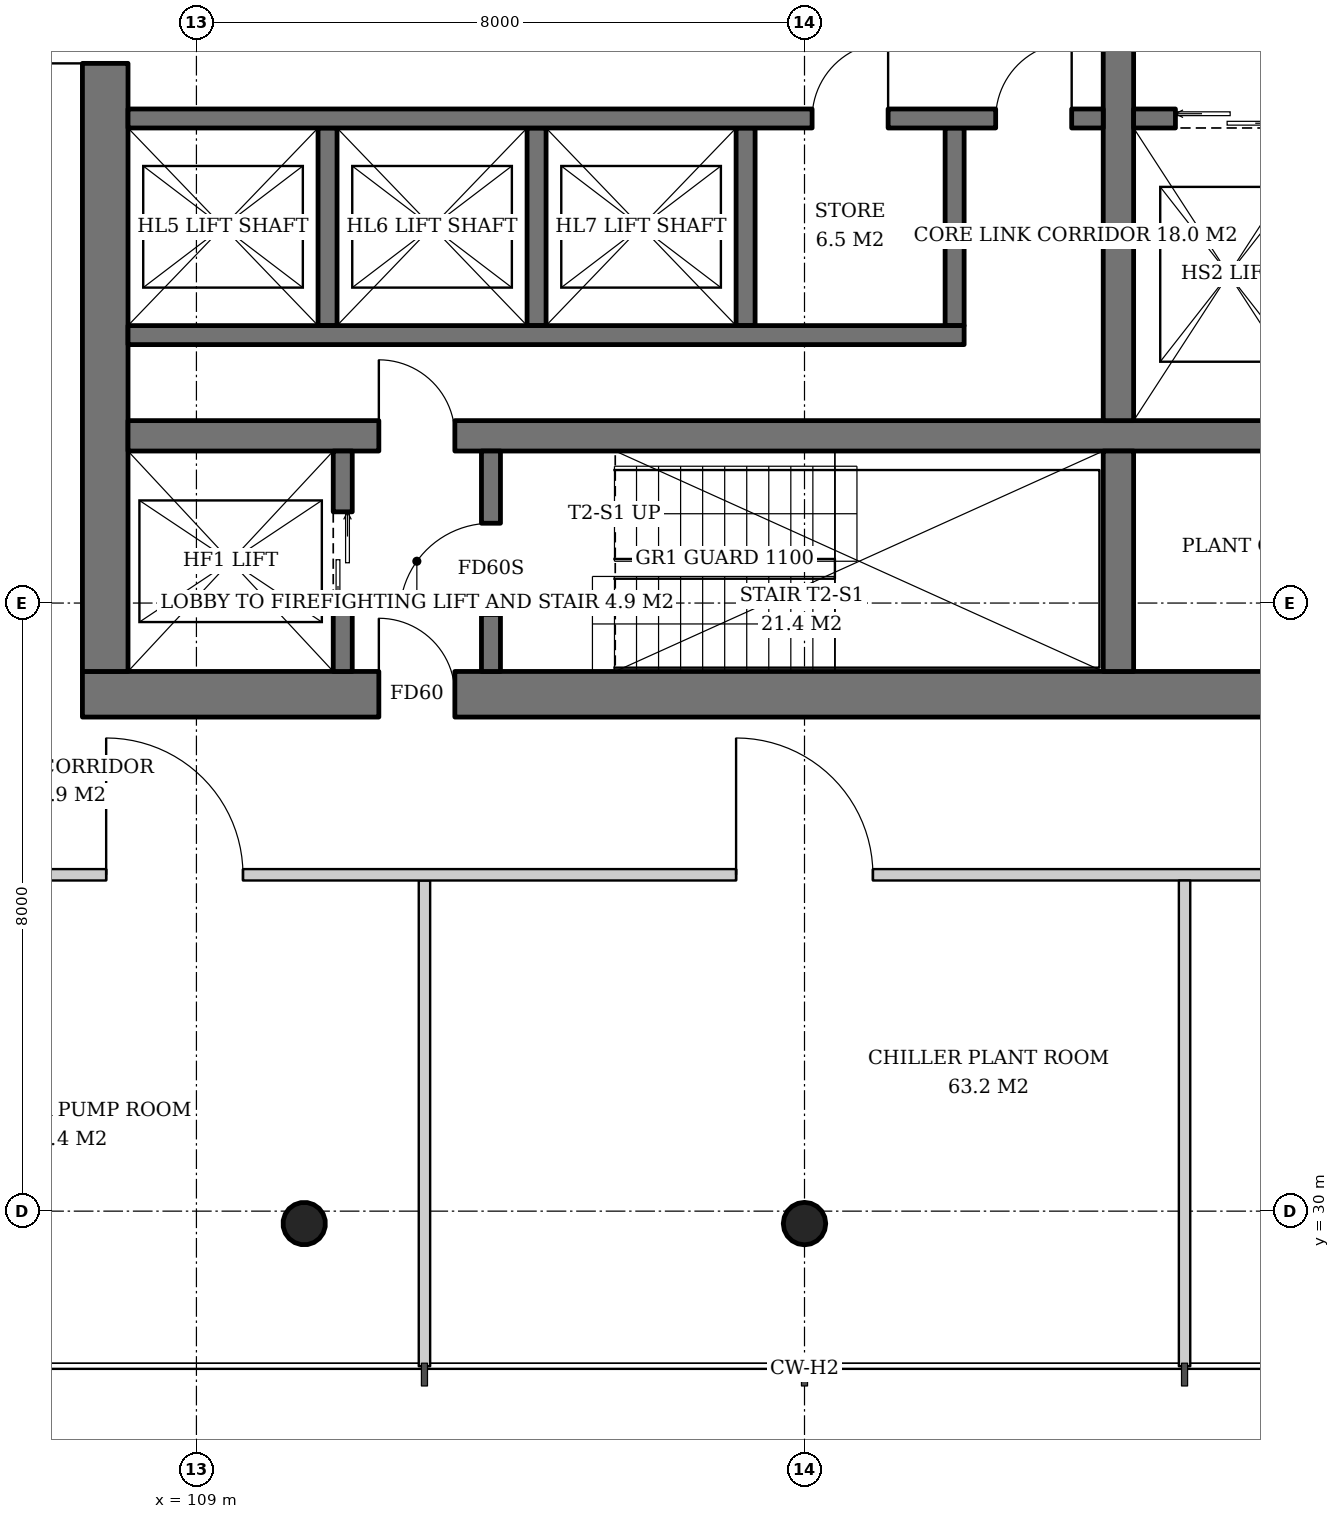
"""IFC4 building model, lengths in metres.
Left out: names, types, materials, properties, quantities, classifications, styles, units other than length and angle.
Written with IfcOpenShell. Run it as: python <this file> out.ifc"""

import sys

from ifc_helpers import new_model, si_unit, direction, frame, frame_2d, origin, origin_2d, place, context, subcontext, project, spatial, rectangle, hollow_circle, extrude, element, fill, save


model = new_model("IFC4")
c1 = context("Model", 3, precision=1e-05, world=origin(), true_north=direction((0.0, 1.0)))
c2 = subcontext(c1, "Body", "Model", "MODEL_VIEW")
j1 = project(units=[si_unit("LENGTHUNIT", "METRE"), si_unit("PLANEANGLEUNIT", "RADIAN")], contexts=[c1])
p1 = place(None, origin())
s1 = spatial("IfcSite", under=j1, at=p1, CompositionType="ELEMENT")
p2 = place(p1, origin())
s2 = spatial("IfcBuilding", under=s1, at=p2, CompositionType="ELEMENT")
p3 = place(p2, frame((0.0, 0.0, 85.6)))
s3 = spatial("IfcBuildingStorey", under=s2, at=p3, CompositionType="ELEMENT", Elevation=85.6)
p4 = place(p3, frame((110.392, 29.784, 0.0), z_axis=(0.02149908433, 0.04306234503, 0.998841040313), x_axis=(-0.894693706707, 0.446680166538, 0.0)))
e1 = element("IfcColumn", 1, at=p4, inside=s3, PredefinedType="COLUMN", context=c2, shape_type="SweptSolid", body=[
    extrude(hollow_circle(Radius=0.28, WallThickness=0.02, at=origin_2d()), origin(), (0.0, 0.0, 1.0), 3.804),
])
p5 = place(p3, frame((117.0, 29.784, 0.0), z_axis=(0.0, 0.043072300418, 0.999071957837), x_axis=(-1.0, 0.0, 0.0)))
e2 = element("IfcColumn", 2, at=p5, inside=s3, PredefinedType="COLUMN", context=c2, shape_type="SweptSolid", body=[
    extrude(hollow_circle(Radius=0.28, WallThickness=0.02, at=origin_2d()), origin(), (0.0, 0.0, 1.0), 3.803),
])
p6 = place(p3, frame((107.5, 36.8, 0.0), z_axis=(0.0, 0.0, 1.0), x_axis=(1.0, 0.0, 0.0)))
e3 = element("IfcWall", 3, at=p6, inside=s3, PredefinedType="SHEAR", context=c2, shape_type="SweptSolid", body=[
    extrude(rectangle(XDim=19.0, YDim=0.6, at=frame_2d((9.5, 0.0))), origin(), (0.0, 0.0, 1.0), 3.8),
])
p7 = place(p6, frame((3.9, 0.0, 0.0)))
e4 = element("IfcOpeningElement", 4, at=p7, cuts=e3, PredefinedType="OPENING", context=c2, shape_type="SweptSolid", body=[
    extrude(rectangle(XDim=1.0, YDim=2.1, at=frame_2d((0.5, 1.05))), frame((0.0, 0.31, 0.0), z_axis=(0.0, -1.0, 0.0), x_axis=(1.0, 0.0, 0.0)), (0.0, 0.0, 1.0), 0.62),
])
p8 = place(p6, frame((15.615, 0.0, 0.0)))
e5 = element("IfcOpeningElement", 5, at=p8, cuts=e3, PredefinedType="OPENING", context=c2, shape_type="SweptSolid", body=[
    extrude(rectangle(XDim=1.0, YDim=2.1, at=frame_2d((0.5, 1.05))), frame((0.0, 0.31, 0.0), z_axis=(0.0, -1.0, 0.0), x_axis=(1.0, 0.0, 0.0)), (0.0, 0.0, 1.0), 0.62),
])
p9 = place(p3, frame((107.8, 37.1, 0.0), z_axis=(0.0, 0.0, 1.0), x_axis=(0.0, 1.0, 0.0)))
e6 = element("IfcWall", 6, at=p9, inside=s3, PredefinedType="SHEAR", context=c2, shape_type="SweptSolid", body=[
    extrude(rectangle(XDim=17.8, YDim=0.6, at=frame_2d((8.9, 0.0))), origin(), (0.0, 0.0, 1.0), 3.8),
])
p10 = place(p9, frame((8.0, 0.0, 0.0)))
e7 = element("IfcOpeningElement", 7, at=p10, cuts=e6, PredefinedType="OPENING", context=c2, shape_type="SweptSolid", body=[
    extrude(rectangle(XDim=1.8, YDim=2.4, at=frame_2d((0.9, 1.2))), frame((0.0, 0.31, 0.0), z_axis=(0.0, -1.0, 0.0), x_axis=(1.0, 0.0, 0.0)), (0.0, 0.0, 1.0), 0.62),
])
p11 = place(p3, frame((108.1, 40.2, 0.0), z_axis=(0.0, 0.0, 1.0), x_axis=(1.0, 0.0, 0.0)))
e8 = element("IfcWall", 8, at=p11, inside=s3, PredefinedType="SHEAR", context=c2, shape_type="SweptSolid", body=[
    extrude(rectangle(XDim=17.8, YDim=0.4, at=frame_2d((8.9, 0.0))), origin(), (0.0, 0.0, 1.0), 3.8),
])
p12 = place(p11, frame((3.3, 0.0, 0.0)))
e9 = element("IfcOpeningElement", 9, at=p12, cuts=e8, PredefinedType="OPENING", context=c2, shape_type="SweptSolid", body=[
    extrude(rectangle(XDim=1.0, YDim=2.1, at=frame_2d((0.5, 1.05))), frame((0.0, 0.21, 0.0), z_axis=(0.0, -1.0, 0.0), x_axis=(1.0, 0.0, 0.0)), (0.0, 0.0, 1.0), 0.42),
])
p13 = place(p3, frame((121.13, 37.1, 0.0), z_axis=(0.0, 0.0, 1.0), x_axis=(0.0, 1.0, 0.0)))
e10 = element("IfcWall", 10, at=p13, inside=s3, PredefinedType="SHEAR", context=c2, shape_type="SweptSolid", body=[
    extrude(rectangle(XDim=2.9, YDim=0.4, at=frame_2d((1.45, 0.0))), origin(), (0.0, 0.0, 1.0), 3.8),
])
p14 = place(p3, frame((121.13, 40.4, 0.0), z_axis=(0.0, 0.0, 1.0), x_axis=(0.0, 1.0, 0.0)))
e11 = element("IfcWall", 11, at=p14, inside=s3, PredefinedType="SHEAR", context=c2, shape_type="SweptSolid", body=[
    extrude(rectangle(XDim=11.2, YDim=0.4, at=frame_2d((5.6, 0.0))), origin(), (0.0, 0.0, 1.0), 3.8),
])
p15 = place(p14, frame((5.1, 0.0, 0.0)))
e12 = element("IfcOpeningElement", 12, at=p15, cuts=e11, PredefinedType="OPENING", context=c2, shape_type="SweptSolid", body=[
    extrude(rectangle(XDim=1.0, YDim=2.1, at=frame_2d((0.5, 1.05))), frame((0.0, 0.21, 0.0), z_axis=(0.0, -1.0, 0.0), x_axis=(1.0, 0.0, 0.0)), (0.0, 0.0, 1.0), 0.42),
])
p16 = place(p3, frame((110.925, 37.1, 0.0), z_axis=(0.0, 0.0, 1.0), x_axis=(0.0, 1.0, 0.0)))
e13 = element("IfcWall", 13, at=p16, inside=s3, PredefinedType="SHEAR", context=c2, shape_type="SweptSolid", body=[
    extrude(rectangle(XDim=2.9, YDim=0.25, at=frame_2d((1.45, 0.0))), origin(), (0.0, 0.0, 1.0), 3.8),
])
p17 = place(p16, frame((0.8, 0.0, 0.0)))
e14 = element("IfcOpeningElement", 14, at=p17, cuts=e13, PredefinedType="OPENING", context=c2, shape_type="SweptSolid", body=[
    extrude(rectangle(XDim=1.3, YDim=2.2, at=frame_2d((0.65, 1.1))), frame((0.0, 0.135, 0.0), z_axis=(0.0, -1.0, 0.0), x_axis=(1.0, 0.0, 0.0)), (0.0, 0.0, 1.0), 0.27),
])
p18 = place(p3, frame((112.875, 37.1, 0.0), z_axis=(0.0, 0.0, 1.0), x_axis=(0.0, 1.0, 0.0)))
e15 = element("IfcWall", 15, at=p18, inside=s3, PredefinedType="SHEAR", context=c2, shape_type="SweptSolid", body=[
    extrude(rectangle(XDim=2.9, YDim=0.25, at=frame_2d((1.45, 0.0))), origin(), (0.0, 0.0, 1.0), 3.8),
])
p19 = place(p18, frame((0.75, 0.0, 0.0)))
e16 = element("IfcOpeningElement", 16, at=p19, cuts=e15, PredefinedType="OPENING", context=c2, shape_type="SweptSolid", body=[
    extrude(rectangle(XDim=1.2, YDim=2.1, at=frame_2d((0.6, 1.05))), frame((0.0, 0.135, 0.0), z_axis=(0.0, -1.0, 0.0), x_axis=(1.0, 0.0, 0.0)), (0.0, 0.0, 1.0), 0.27),
])
for number, where, z_axis, x_axis in (
    (17, (110.725, 44.25, 0.0), (0.0, 0.0, 1.0), (0.0, -1.0, 0.0)),
    (18, (113.475, 44.25, 0.0), (0.0, 0.0, 1.0), (0.0, -1.0, 0.0)),
    (19, (116.225, 44.25, 0.0), (0.0, 0.0, 1.0), (0.0, -1.0, 0.0)),
    (20, (118.975, 44.25, 0.0), (0.0, 0.0, 1.0), (0.0, -1.0, 0.0)),
):
    element("IfcWall", number, at=place(p3, frame(where, z_axis=z_axis, x_axis=x_axis)), inside=s3, PredefinedType="SHEAR", context=c2, shape_type="SweptSolid", body=[
        extrude(rectangle(XDim=2.6, YDim=0.25, at=frame_2d((1.3, 0.0))), origin(), (0.0, 0.0, 1.0), 3.8),
    ])
p20 = place(p3, frame((108.1, 41.525, 0.0), z_axis=(0.0, 0.0, 1.0), x_axis=(1.0, 0.0, 0.0)))
e21 = element("IfcWall", 21, at=p20, inside=s3, PredefinedType="SHEAR", context=c2, shape_type="SweptSolid", body=[
    extrude(rectangle(XDim=11.0, YDim=0.25, at=frame_2d((5.5, 0.0))), origin(), (0.0, 0.0, 1.0), 3.8),
])
p21 = place(p3, frame((108.1, 44.375, 0.0), z_axis=(0.0, 0.0, 1.0), x_axis=(1.0, 0.0, 0.0)))
e22 = element("IfcWall", 22, at=p21, inside=s3, PredefinedType="SHEAR", context=c2, shape_type="SweptSolid", body=[
    extrude(rectangle(XDim=12.83, YDim=0.25, at=frame_2d((6.415, 0.0))), origin(), (0.0, 0.0, 1.0), 3.8),
])
p22 = place(p21, frame((9.0, 0.0, 0.0)))
e23 = element("IfcOpeningElement", 23, at=p22, cuts=e22, PredefinedType="OPENING", context=c2, shape_type="SweptSolid", body=[
    extrude(rectangle(XDim=1.0, YDim=2.1, at=frame_2d((0.5, 1.05))), frame((0.0, 0.135, 0.0), z_axis=(0.0, -1.0, 0.0), x_axis=(1.0, 0.0, 0.0)), (0.0, 0.0, 1.0), 0.27),
])
p23 = place(p21, frame((11.415, 0.0, 0.0)))
e24 = element("IfcOpeningElement", 24, at=p23, cuts=e22, PredefinedType="OPENING", context=c2, shape_type="SweptSolid", body=[
    extrude(rectangle(XDim=1.0, YDim=2.1, at=frame_2d((0.5, 1.05))), frame((0.0, 0.135, 0.0), z_axis=(0.0, -1.0, 0.0), x_axis=(1.0, 0.0, 0.0)), (0.0, 0.0, 1.0), 0.27),
])
p24 = place(p3, frame((121.33, 44.375, 0.0), z_axis=(0.0, 0.0, 1.0), x_axis=(1.0, 0.0, 0.0)))
e25 = element("IfcWall", 25, at=p24, inside=s3, PredefinedType="SHEAR", context=c2, shape_type="SweptSolid", body=[
    extrude(rectangle(XDim=4.57, YDim=0.25, at=frame_2d((2.285, 0.0))), origin(), (0.0, 0.0, 1.0), 3.8),
])
p25 = place(p24, frame((0.55, 0.0, 0.0)))
e26 = element("IfcOpeningElement", 26, at=p25, cuts=e25, PredefinedType="OPENING", context=c2, shape_type="SweptSolid", body=[
    extrude(rectangle(XDim=1.4, YDim=2.4, at=frame_2d((0.7, 1.2))), frame((0.0, 0.135, 0.0), z_axis=(0.0, -1.0, 0.0), x_axis=(1.0, 0.0, 0.0)), (0.0, 0.0, 1.0), 0.27),
])
p26 = place(p24, frame((3.26, 0.0, 0.0)))
e27 = element("IfcOpeningElement", 27, at=p26, cuts=e25, PredefinedType="OPENING", context=c2, shape_type="SweptSolid", body=[
    extrude(rectangle(XDim=0.8, YDim=2.0, at=frame_2d((0.4, 1.0))), frame((0.0, 0.135, 0.0), z_axis=(0.0, -1.0, 0.0), x_axis=(1.0, 0.0, 0.0)), (0.0, 0.0, 1.0), 0.27),
])
p27 = place(p3, frame((112.0, 34.35, 0.0), z_axis=(0.0, 0.0, 1.0), x_axis=(0.0, -1.0, 0.0)))
e28 = element("IfcWall", 28, at=p27, inside=s3, PredefinedType="SOLIDWALL", context=c2, shape_type="SweptSolid", body=[
    extrude(rectangle(XDim=6.39, YDim=0.15, at=frame_2d((3.195, 0.0))), origin(), (0.0, 0.0, 1.0), 3.0),
])
p28 = place(p3, frame((105.35, 34.425, 0.0), z_axis=(0.0, 0.0, 1.0), x_axis=(1.0, 0.0, 0.0)))
e29 = element("IfcWall", 29, at=p28, inside=s3, PredefinedType="SOLIDWALL", context=c2, shape_type="SweptSolid", body=[
    extrude(rectangle(XDim=23.15, YDim=0.15, at=frame_2d((11.575, 0.0))), origin(), (0.0, 0.0, 1.0), 2.9),
])
p29 = place(p28, frame((2.462, 0.0, 0.0)))
e30 = element("IfcOpeningElement", 30, at=p29, cuts=e29, PredefinedType="OPENING", context=c2, shape_type="SweptSolid", body=[
    extrude(rectangle(XDim=1.8, YDim=2.4, at=frame_2d((0.9, 1.2))), frame((0.0, 0.085, 0.0), z_axis=(0.0, -1.0, 0.0), x_axis=(1.0, 0.0, 0.0)), (0.0, 0.0, 1.0), 0.17),
])
p30 = place(p28, frame((10.75, 0.0, 0.0)))
e31 = element("IfcOpeningElement", 31, at=p30, cuts=e29, PredefinedType="OPENING", context=c2, shape_type="SweptSolid", body=[
    extrude(rectangle(XDim=1.8, YDim=2.4, at=frame_2d((0.9, 1.2))), frame((0.0, 0.085, 0.0), z_axis=(0.0, -1.0, 0.0), x_axis=(1.0, 0.0, 0.0)), (0.0, 0.0, 1.0), 0.17),
])
p31 = place(p3, frame((122.0, 34.35, 0.0), z_axis=(0.0, 0.0, 1.0), x_axis=(0.0, -1.0, 0.0)))
e32 = element("IfcWall", 32, at=p31, inside=s3, PredefinedType="SOLIDWALL", context=c2, shape_type="SweptSolid", body=[
    extrude(rectangle(XDim=6.39, YDim=0.15, at=frame_2d((3.195, 0.0))), origin(), (0.0, 0.0, 1.0), 3.2),
])
p32 = place(p17, origin())
e33 = element("IfcDoor", 33, at=p32, inside=s3, OperationType="DOUBLE_DOOR_SLIDING", PredefinedType="DOOR", context=c2, shape_type="SweptSolid", body=[
    extrude(rectangle(XDim=1.3, YDim=2.2, at=frame_2d((0.65, 1.1))), frame((0.0, 0.025, 0.0), z_axis=(0.0, -1.0, 0.0), x_axis=(1.0, 0.0, 0.0)), (0.0, 0.0, 1.0), 0.05),
])
fill(e14, e33)
p33 = place(p19, origin())
e34 = element("IfcDoor", 34, at=p33, inside=s3, OperationType="SINGLE_SWING_LEFT", PredefinedType="DOOR", context=c2, shape_type="SweptSolid", body=[
    extrude(rectangle(XDim=1.2, YDim=2.1, at=frame_2d((0.6, 1.05))), frame((0.0, 0.025, 0.0), z_axis=(0.0, -1.0, 0.0), x_axis=(1.0, 0.0, 0.0)), (0.0, 0.0, 1.0), 0.05),
])
fill(e16, e34)
p34 = place(p22, origin())
e35 = element("IfcDoor", 35, at=p34, inside=s3, OperationType="SINGLE_SWING_RIGHT", PredefinedType="DOOR", context=c2, shape_type="SweptSolid", body=[
    extrude(rectangle(XDim=1.0, YDim=2.1, at=frame_2d((0.5, 1.05))), frame((0.0, 0.025, 0.0), z_axis=(0.0, -1.0, 0.0), x_axis=(1.0, 0.0, 0.0)), (0.0, 0.0, 1.0), 0.05),
])
fill(e23, e35)
p35 = place(p23, origin())
e36 = element("IfcDoor", 36, at=p35, inside=s3, OperationType="SINGLE_SWING_RIGHT", PredefinedType="DOOR", context=c2, shape_type="SweptSolid", body=[
    extrude(rectangle(XDim=1.0, YDim=2.1, at=frame_2d((0.5, 1.05))), frame((0.0, 0.025, 0.0), z_axis=(0.0, -1.0, 0.0), x_axis=(1.0, 0.0, 0.0)), (0.0, 0.0, 1.0), 0.05),
])
fill(e24, e36)
p36 = place(p25, origin())
e37 = element("IfcDoor", 37, at=p36, inside=s3, OperationType="DOUBLE_DOOR_SLIDING", PredefinedType="DOOR", context=c2, shape_type="SweptSolid", body=[
    extrude(rectangle(XDim=1.4, YDim=2.4, at=frame_2d((0.7, 1.2))), frame((0.0, 0.025, 0.0), z_axis=(0.0, -1.0, 0.0), x_axis=(1.0, 0.0, 0.0)), (0.0, 0.0, 1.0), 0.05),
])
fill(e26, e37)
p37 = place(p7, origin())
e38 = element("IfcDoor", 38, at=p37, inside=s3, OperationType="SINGLE_SWING_LEFT", PredefinedType="DOOR", context=c2, shape_type="SweptSolid", body=[
    extrude(rectangle(XDim=1.0, YDim=2.1, at=frame_2d((0.5, 1.05))), frame((0.0, 0.025, 0.0), z_axis=(0.0, -1.0, 0.0), x_axis=(1.0, 0.0, 0.0)), (0.0, 0.0, 1.0), 0.05),
])
fill(e4, e38)
p38 = place(p10, origin())
e39 = element("IfcDoor", 39, at=p38, inside=s3, OperationType="DOUBLE_DOOR_SINGLE_SWING", PredefinedType="DOOR", context=c2, shape_type="SweptSolid", body=[
    extrude(rectangle(XDim=1.8, YDim=2.4, at=frame_2d((0.9, 1.2))), frame((0.0, 0.025, 0.0), z_axis=(0.0, -1.0, 0.0), x_axis=(1.0, 0.0, 0.0)), (0.0, 0.0, 1.0), 0.05),
])
fill(e7, e39)
p39 = place(p12, origin())
e40 = element("IfcDoor", 40, at=p39, inside=s3, OperationType="SINGLE_SWING_LEFT", PredefinedType="DOOR", context=c2, shape_type="SweptSolid", body=[
    extrude(rectangle(XDim=1.0, YDim=2.1, at=frame_2d((0.5, 1.05))), frame((0.0, 0.025, 0.0), z_axis=(0.0, -1.0, 0.0), x_axis=(1.0, 0.0, 0.0)), (0.0, 0.0, 1.0), 0.05),
])
fill(e9, e40)
p40 = place(p29, origin())
e41 = element("IfcDoor", 41, at=p40, inside=s3, OperationType="DOUBLE_DOOR_SINGLE_SWING", PredefinedType="DOOR", context=c2, shape_type="SweptSolid", body=[
    extrude(rectangle(XDim=1.8, YDim=2.4, at=frame_2d((0.9, 1.2))), frame((0.0, 0.025, 0.0), z_axis=(0.0, -1.0, 0.0), x_axis=(1.0, 0.0, 0.0)), (0.0, 0.0, 1.0), 0.05),
])
fill(e30, e41)
p41 = place(p30, origin())
e42 = element("IfcDoor", 42, at=p41, inside=s3, OperationType="DOUBLE_DOOR_SINGLE_SWING", PredefinedType="DOOR", context=c2, shape_type="SweptSolid", body=[
    extrude(rectangle(XDim=1.8, YDim=2.4, at=frame_2d((0.9, 1.2))), frame((0.0, 0.025, 0.0), z_axis=(0.0, -1.0, 0.0), x_axis=(1.0, 0.0, 0.0)), (0.0, 0.0, 1.0), 0.05),
])
fill(e31, e42)
save(model, sys.argv[1])
